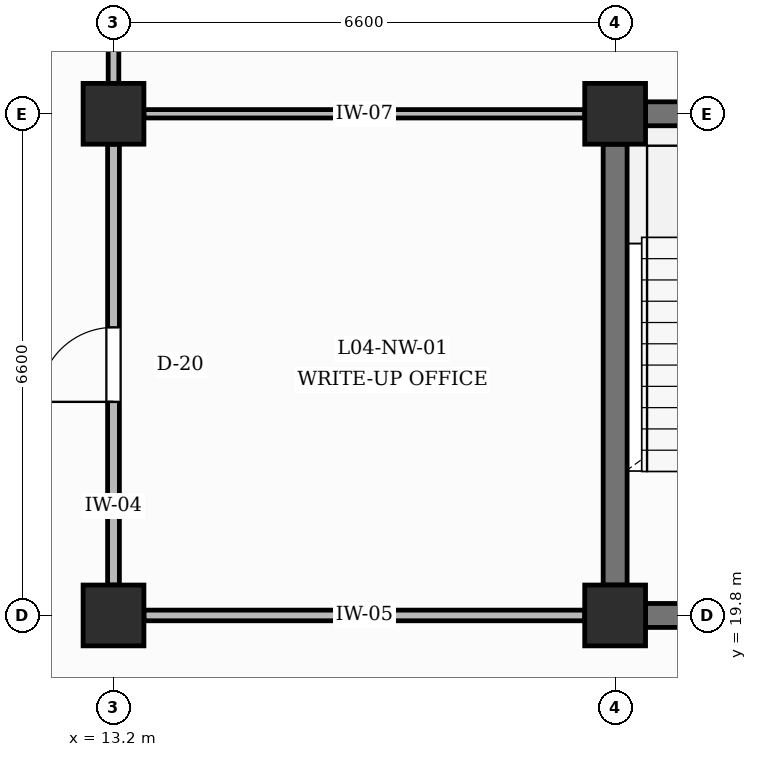
"""IFC4 building model, lengths in metres.
Left out: names, types, materials, properties, quantities, classifications, styles, units other than length and angle.
Written with IfcOpenShell. Run it as: python <this file> out.ifc"""

import sys

from ifc_helpers import new_model, si_unit, direction, frame, frame_2d, origin, origin_2d, place, context, subcontext, project, spatial, rectangle, extrude, element, fill, save


model = new_model("IFC4")
c1 = context("Model", 3, precision=1e-05, world=origin(), true_north=direction((0.0, 1.0)))
c2 = subcontext(c1, "Body", "Model", "MODEL_VIEW")
j1 = project(units=[si_unit("LENGTHUNIT", "METRE"), si_unit("PLANEANGLEUNIT", "RADIAN")], contexts=[c1])
p1 = place(None, origin())
s1 = spatial("IfcSite", under=j1, at=p1, CompositionType="ELEMENT")
p2 = place(p1, origin())
s2 = spatial("IfcBuilding", under=s1, at=p2, CompositionType="ELEMENT")
p3 = place(p2, frame((0.0, 0.0, 18.6)))
s3 = spatial("IfcBuildingStorey", under=s2, at=p3, CompositionType="ELEMENT", Elevation=18.6)
for number, where, z_axis, x_axis in (
    (1, (13.2, 19.8, 0.0), (0.0, 0.0, 1.0), (1.0, 0.0, 0.0)),
    (2, (13.2, 26.4, 0.0), (0.0, 0.0, 1.0), (1.0, 0.0, 0.0)),
    (3, (19.8, 19.8, 0.0), (0.0, 0.0, 1.0), (1.0, 0.0, 0.0)),
    (4, (19.8, 26.4, 0.0), (0.0, 0.0, 1.0), (1.0, 0.0, 0.0)),
):
    element("IfcColumn", number, at=place(p3, frame(where, z_axis=z_axis, x_axis=x_axis)), inside=s3, PredefinedType="COLUMN", context=c2, shape_type="SweptSolid", body=[
        extrude(rectangle(XDim=0.8, YDim=0.8, at=origin_2d()), origin(), (0.0, 0.0, 1.0), 4.2),
    ])
p4 = place(p3, frame((20.2, 19.8, 0.0), z_axis=(0.0, 0.0, 1.0), x_axis=(1.0, 0.0, 0.0)))
e5 = element("IfcWall", 5, at=p4, inside=s3, PredefinedType="SHEAR", context=c2, shape_type="SweptSolid", body=[
    extrude(rectangle(XDim=5.8, YDim=0.315, at=frame_2d((2.9, 0.0))), origin(), (0.0, 0.0, 1.0), 3.16),
])
p5 = place(p4, frame((2.325, 0.0, 0.0)))
e6 = element("IfcOpeningElement", 6, at=p5, cuts=e5, PredefinedType="OPENING", context=c2, shape_type="SweptSolid", body=[
    extrude(rectangle(XDim=1.15, YDim=2.2, at=frame_2d((0.575, 1.1))), frame((0.0, 0.167, 0.0), z_axis=(0.0, -1.0, 0.0), x_axis=(1.0, 0.0, 0.0)), (0.0, 0.0, 1.0), 0.335),
])
p6 = place(p3, frame((20.2, 26.4, 0.0), z_axis=(0.0, 0.0, 1.0), x_axis=(1.0, 0.0, 0.0)))
e7 = element("IfcWall", 7, at=p6, inside=s3, PredefinedType="SHEAR", context=c2, shape_type="SweptSolid", body=[
    extrude(rectangle(XDim=5.825, YDim=0.315, at=frame_2d((2.913, 0.0))), origin(), (0.0, 0.0, 1.0), 3.16),
])
p7 = place(p3, frame((19.8, 20.2, 0.0), z_axis=(0.0, 0.0, 1.0), x_axis=(0.0, 1.0, 0.0)))
e8 = element("IfcWall", 8, at=p7, inside=s3, PredefinedType="SHEAR", context=c2, shape_type="SweptSolid", body=[
    extrude(rectangle(XDim=5.8, YDim=0.315, at=frame_2d((2.9, 0.0))), origin(), (0.0, 0.0, 1.0), 3.16),
])
p8 = place(p3, frame((13.2, 20.2, 0.0), z_axis=(0.0, 0.0, 1.0), x_axis=(0.0, 1.0, 0.0)))
e9 = element("IfcWall", 9, at=p8, inside=s3, PredefinedType="PARTITIONING", context=c2, shape_type="SweptSolid", body=[
    extrude(rectangle(XDim=5.8, YDim=0.155, at=frame_2d((2.9, 0.0))), origin(), (0.0, 0.0, 1.0), 3.16),
])
p9 = place(p8, frame((2.41, 0.0, 0.0)))
e10 = element("IfcOpeningElement", 10, at=p9, cuts=e9, PredefinedType="OPENING", context=c2, shape_type="SweptSolid", body=[
    extrude(rectangle(XDim=0.98, YDim=2.15, at=frame_2d((0.49, 1.075))), frame((0.0, 0.087, 0.0), z_axis=(0.0, -1.0, 0.0), x_axis=(1.0, 0.0, 0.0)), (0.0, 0.0, 1.0), 0.175),
])
p10 = place(p3, frame((13.2, 26.8, 0.0), z_axis=(0.0, 0.0, 1.0), x_axis=(0.0, 1.0, 0.0)))
e11 = element("IfcWall", 11, at=p10, inside=s3, PredefinedType="PARTITIONING", context=c2, shape_type="SweptSolid", body=[
    extrude(rectangle(XDim=5.8, YDim=0.14, at=frame_2d((2.9, 0.0))), origin(), (0.0, 0.0, 1.0), 3.16),
])
p11 = place(p10, frame((2.175, 0.0, 0.0)))
e12 = element("IfcOpeningElement", 12, at=p11, cuts=e11, PredefinedType="OPENING", context=c2, shape_type="SweptSolid", body=[
    extrude(rectangle(XDim=1.45, YDim=2.25, at=frame_2d((0.725, 1.125))), frame((0.0, 0.08, 0.0), z_axis=(0.0, -1.0, 0.0), x_axis=(1.0, 0.0, 0.0)), (0.0, 0.0, 1.0), 0.16),
])
p12 = place(p3, frame((13.6, 19.8, 0.0), z_axis=(0.0, 0.0, 1.0), x_axis=(1.0, 0.0, 0.0)))
e13 = element("IfcWall", 13, at=p12, inside=s3, PredefinedType="PARTITIONING", context=c2, shape_type="SweptSolid", body=[
    extrude(rectangle(XDim=5.8, YDim=0.14, at=frame_2d((2.9, 0.0))), origin(), (0.0, 0.0, 1.0), 3.16),
])
p13 = place(p3, frame((13.6, 26.4, 0.0), z_axis=(0.0, 0.0, 1.0), x_axis=(1.0, 0.0, 0.0)))
e14 = element("IfcWall", 14, at=p13, inside=s3, PredefinedType="PARTITIONING", context=c2, shape_type="SweptSolid", body=[
    extrude(rectangle(XDim=5.8, YDim=0.11, at=frame_2d((2.9, 0.0))), origin(), (0.0, 0.0, 1.0), 3.16),
])
p14 = place(p9, origin())
e15 = element("IfcDoor", 15, at=p14, inside=s3, OperationType="SINGLE_SWING_LEFT", PredefinedType="DOOR", context=c2, shape_type="SweptSolid", body=[
    extrude(rectangle(XDim=0.98, YDim=2.15, at=frame_2d((0.49, 1.075))), frame((0.0, 0.025, 0.0), z_axis=(0.0, -1.0, 0.0), x_axis=(1.0, 0.0, 0.0)), (0.0, 0.0, 1.0), 0.05),
])
fill(e10, e15)
save(model, sys.argv[1])
